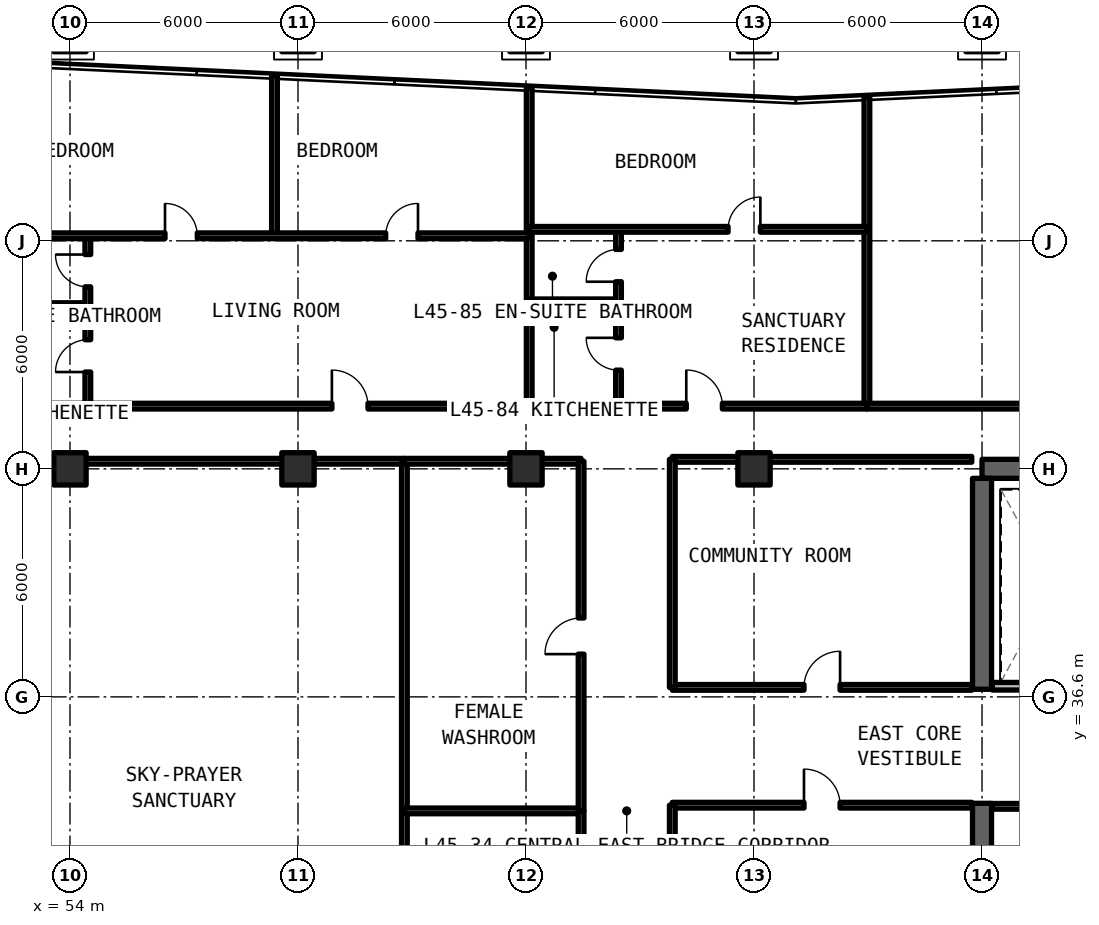
"""IFC4 building model, lengths in metres.
Left out: names, types, materials, properties, quantities, classifications, styles, units other than length and angle.
Written with IfcOpenShell. Run it as: python <this file> out.ifc"""

import sys

from ifc_helpers import new_model, si_unit, direction, frame, frame_2d, origin, origin_2d, place, context, subcontext, project, spatial, rectangle, extrude, element, fill, save


model = new_model("IFC4")
c1 = context("Model", 3, precision=1e-05, world=origin(), true_north=direction((0.0, 1.0)))
c2 = subcontext(c1, "Body", "Model", "MODEL_VIEW")
j1 = project(units=[si_unit("LENGTHUNIT", "METRE"), si_unit("PLANEANGLEUNIT", "RADIAN")], contexts=[c1])
p1 = place(None, origin())
s1 = spatial("IfcSite", under=j1, at=p1, CompositionType="ELEMENT")
p2 = place(p1, origin())
s2 = spatial("IfcBuilding", under=s1, at=p2, CompositionType="ELEMENT")
p3 = place(p2, frame((0.0, 0.0, 162.03)))
s3 = spatial("IfcBuildingStorey", under=s2, at=p3, CompositionType="ELEMENT", Elevation=162.03)
p4 = place(p3, frame((90.0, 42.6, 0.0), z_axis=(0.0, 0.0, 1.0), x_axis=(-1.0, 0.0, 0.0)))
e1 = element("IfcWall", 1, at=p4, inside=s3, PredefinedType="SHEAR", context=c2, shape_type="SweptSolid", body=[
    extrude(rectangle(XDim=12.0, YDim=0.5, at=frame_2d((6.0, 0.0))), origin(), (0.0, 0.0, 1.0), 3.63),
])
p5 = place(p3, frame((78.0, 24.85, 0.0), z_axis=(0.0, 0.0, 1.0), x_axis=(0.0, 1.0, 0.0)))
e2 = element("IfcWall", 2, at=p5, inside=s3, PredefinedType="SHEAR", context=c2, shape_type="SweptSolid", body=[
    extrude(rectangle(XDim=8.95, YDim=0.5, at=frame_2d((4.475, 0.0))), origin(), (0.0, 0.0, 1.0), 3.63),
])
p6 = place(p3, frame((78.0, 36.8, 0.0), z_axis=(0.0, 0.0, 1.0), x_axis=(0.0, 1.0, 0.0)))
e3 = element("IfcWall", 3, at=p6, inside=s3, PredefinedType="SHEAR", context=c2, shape_type="SweptSolid", body=[
    extrude(rectangle(XDim=5.55, YDim=0.5, at=frame_2d((2.775, 0.0))), origin(), (0.0, 0.0, 1.0), 3.63),
])
for number, where, z_axis, x_axis in (
    (4, (54.0, 42.6, 0.0), (0.0, 0.0, 1.0), (1.0, 0.0, 0.0)),
    (5, (60.0, 42.6, 0.0), (0.0, 0.0, 1.0), (1.0, 0.0, 0.0)),
    (6, (66.0, 42.6, 0.0), (0.0, 0.0, 1.0), (1.0, 0.0, 0.0)),
    (7, (72.0, 42.6, 0.0), (0.0, 0.0, 1.0), (1.0, 0.0, 0.0)),
):
    element("IfcColumn", number, at=place(p3, frame(where, z_axis=z_axis, x_axis=x_axis)), inside=s3, PredefinedType="COLUMN", context=c2, shape_type="SweptSolid", body=[
        extrude(rectangle(XDim=0.85, YDim=0.85, at=origin_2d()), origin(), (0.0, 0.0, 1.0), 3.63),
    ])
p7 = place(p3, frame((78.27, 33.72, 0.0), z_axis=(0.0, 0.0, 1.0), x_axis=(1.0, 0.0, 0.0)))
e8 = element("IfcWall", 8, at=p7, inside=s3, PredefinedType="SOLIDWALL", context=c2, shape_type="SweptSolid", body=[
    extrude(rectangle(XDim=3.05, YDim=0.15, at=frame_2d((1.525, 0.0))), origin(), (0.0, 0.0, 1.0), 2.63),
])
p8 = place(p3, frame((78.27, 36.88, 0.0), z_axis=(0.0, 0.0, 1.0), x_axis=(1.0, 0.0, 0.0)))
e9 = element("IfcWall", 9, at=p8, inside=s3, PredefinedType="SOLIDWALL", context=c2, shape_type="SweptSolid", body=[
    extrude(rectangle(XDim=3.05, YDim=0.2, at=frame_2d((1.525, 0.0))), origin(), (0.0, 0.0, 1.0), 2.63),
])
p9 = place(p3, frame((69.85, 33.75, 0.0), z_axis=(0.0, 0.0, 1.0), x_axis=(1.0, 0.0, 0.0)))
e10 = element("IfcWall", 10, at=p9, inside=s3, PredefinedType="SOLIDWALL", context=c2, shape_type="SweptSolid", body=[
    extrude(rectangle(XDim=7.88, YDim=0.15, at=frame_2d((3.94, 0.0))), origin(), (0.0, 0.0, 1.0), 2.63),
])
p10 = place(p9, frame((3.465, 0.0, 0.0)))
e11 = element("IfcOpeningElement", 11, at=p10, cuts=e10, PredefinedType="OPENING", context=c2, shape_type="SweptSolid", body=[
    extrude(rectangle(XDim=0.95, YDim=2.15, at=frame_2d((0.475, 1.075))), frame((0.0, 0.085, 0.0), z_axis=(0.0, -1.0, 0.0), x_axis=(1.0, 0.0, 0.0)), (0.0, 0.0, 1.0), 0.17),
])
p11 = place(p3, frame((69.85, 24.35, 0.0), z_axis=(0.0, 0.0, 1.0), x_axis=(0.0, 1.0, 0.0)))
e12 = element("IfcWall", 12, at=p11, inside=s3, PredefinedType="SOLIDWALL", context=c2, shape_type="SweptSolid", body=[
    extrude(rectangle(XDim=9.4, YDim=0.15, at=frame_2d((4.7, 0.0))), origin(), (0.0, 0.0, 1.0), 2.63),
])
p12 = place(p3, frame((69.85, 36.85, 0.0), z_axis=(0.0, 0.0, 1.0), x_axis=(1.0, 0.0, 0.0)))
e13 = element("IfcWall", 13, at=p12, inside=s3, PredefinedType="SOLIDWALL", context=c2, shape_type="SweptSolid", body=[
    extrude(rectangle(XDim=7.88, YDim=0.15, at=frame_2d((3.94, 0.0))), origin(), (0.0, 0.0, 1.0), 2.63),
])
p13 = place(p12, frame((3.465, 0.0, 0.0)))
e14 = element("IfcOpeningElement", 14, at=p13, cuts=e13, PredefinedType="OPENING", context=c2, shape_type="SweptSolid", body=[
    extrude(rectangle(XDim=0.95, YDim=2.15, at=frame_2d((0.475, 1.075))), frame((0.0, 0.085, 0.0), z_axis=(0.0, -1.0, 0.0), x_axis=(1.0, 0.0, 0.0)), (0.0, 0.0, 1.0), 0.17),
])
p14 = place(p3, frame((69.85, 42.85, 0.0), z_axis=(0.0, 0.0, 1.0), x_axis=(1.0, 0.0, 0.0)))
e15 = element("IfcWall", 15, at=p14, inside=s3, PredefinedType="SOLIDWALL", context=c2, shape_type="SweptSolid", body=[
    extrude(rectangle(XDim=7.88, YDim=0.15, at=frame_2d((3.94, 0.0))), origin(), (0.0, 0.0, 1.0), 2.63),
])
p15 = place(p3, frame((69.85, 36.85, 0.0), z_axis=(0.0, 0.0, 1.0), x_axis=(0.0, 1.0, 0.0)))
e16 = element("IfcWall", 16, at=p15, inside=s3, PredefinedType="SOLIDWALL", context=c2, shape_type="SweptSolid", body=[
    extrude(rectangle(XDim=6.0, YDim=0.15, at=frame_2d((3.0, 0.0))), origin(), (0.0, 0.0, 1.0), 2.63),
])
p16 = place(p3, frame((51.2, 42.8, 0.0), z_axis=(0.0, 0.0, 1.0), x_axis=(1.0, 0.0, 0.0)))
e17 = element("IfcWall", 17, at=p16, inside=s3, PredefinedType="SOLIDWALL", context=c2, shape_type="SweptSolid", body=[
    extrude(rectangle(XDim=11.6, YDim=0.15, at=frame_2d((5.8, 0.0))), origin(), (0.0, 0.0, 1.0), 2.63),
])
p17 = place(p3, frame((62.8, 24.4, 0.0), z_axis=(0.0, 0.0, 1.0), x_axis=(0.0, 1.0, 0.0)))
e18 = element("IfcWall", 18, at=p17, inside=s3, PredefinedType="SOLIDWALL", context=c2, shape_type="SweptSolid", body=[
    extrude(rectangle(XDim=18.4, YDim=0.15, at=frame_2d((9.2, 0.0))), origin(), (0.0, 0.0, 1.0), 2.63),
])
p18 = place(p3, frame((62.8, 33.6, 0.0), z_axis=(0.0, 0.0, 1.0), x_axis=(1.0, 0.0, 0.0)))
e19 = element("IfcWall", 19, at=p18, inside=s3, PredefinedType="SOLIDWALL", context=c2, shape_type="SweptSolid", body=[
    extrude(rectangle(XDim=4.65, YDim=0.15, at=frame_2d((2.325, 0.0))), origin(), (0.0, 0.0, 1.0), 2.63),
])
p19 = place(p3, frame((67.45, 24.4, 0.0), z_axis=(0.0, 0.0, 1.0), x_axis=(0.0, 1.0, 0.0)))
e20 = element("IfcWall", 20, at=p19, inside=s3, PredefinedType="SOLIDWALL", context=c2, shape_type="SweptSolid", body=[
    extrude(rectangle(XDim=9.2, YDim=0.15, at=frame_2d((4.6, 0.0))), origin(), (0.0, 0.0, 1.0), 2.63),
])
p20 = place(p19, frame((4.125, 0.0, 0.0)))
e21 = element("IfcOpeningElement", 21, at=p20, cuts=e20, PredefinedType="OPENING", context=c2, shape_type="SweptSolid", body=[
    extrude(rectangle(XDim=0.95, YDim=2.15, at=frame_2d((0.475, 1.075))), frame((0.0, 0.085, 0.0), z_axis=(0.0, -1.0, 0.0), x_axis=(1.0, 0.0, 0.0)), (0.0, 0.0, 1.0), 0.17),
])
p21 = place(p3, frame((62.8, 42.8, 0.0), z_axis=(0.0, 0.0, 1.0), x_axis=(1.0, 0.0, 0.0)))
e22 = element("IfcWall", 22, at=p21, inside=s3, PredefinedType="SOLIDWALL", context=c2, shape_type="SweptSolid", body=[
    extrude(rectangle(XDim=4.65, YDim=0.15, at=frame_2d((2.325, 0.0))), origin(), (0.0, 0.0, 1.0), 2.63),
])
p22 = place(p3, frame((67.45, 33.6, 0.0), z_axis=(0.0, 0.0, 1.0), x_axis=(0.0, 1.0, 0.0)))
e23 = element("IfcWall", 23, at=p22, inside=s3, PredefinedType="SOLIDWALL", context=c2, shape_type="SweptSolid", body=[
    extrude(rectangle(XDim=9.2, YDim=0.15, at=frame_2d((4.6, 0.0))), origin(), (0.0, 0.0, 1.0), 2.63),
])
p23 = place(p22, frame((4.125, 0.0, 0.0)))
e24 = element("IfcOpeningElement", 24, at=p23, cuts=e23, PredefinedType="OPENING", context=c2, shape_type="SweptSolid", body=[
    extrude(rectangle(XDim=0.95, YDim=2.15, at=frame_2d((0.475, 1.075))), frame((0.0, 0.085, 0.0), z_axis=(0.0, -1.0, 0.0), x_axis=(1.0, 0.0, 0.0)), (0.0, 0.0, 1.0), 0.17),
])
p24 = place(p3, frame((66.084, 44.25, 0.0), z_axis=(0.0, 0.0, 1.0), x_axis=(0.0, 1.0, 0.0)))
e25 = element("IfcWall", 25, at=p24, inside=s3, PredefinedType="SOLIDWALL", context=c2, shape_type="SweptSolid", body=[
    extrude(rectangle(XDim=8.377, YDim=0.15, at=frame_2d((4.188, 0.0))), origin(), (0.0, 0.0, 1.0), 2.63),
])
p25 = place(p3, frame((52.12, 46.895, 0.0), z_axis=(0.0, 0.0, 1.0), x_axis=(1.0, 0.0, 0.0)))
e26 = element("IfcWall", 26, at=p25, inside=s3, PredefinedType="PARTITIONING", context=c2, shape_type="SweptSolid", body=[
    extrude(rectangle(XDim=2.35, YDim=0.15, at=frame_2d((1.175, 0.0))), origin(), (0.0, 0.0, 1.0), 2.63),
])
p26 = place(p3, frame((54.47, 44.25, 0.0), z_axis=(0.0, 0.0, 1.0), x_axis=(0.0, 1.0, 0.0)))
e27 = element("IfcWall", 27, at=p26, inside=s3, PredefinedType="PARTITIONING", context=c2, shape_type="SweptSolid", body=[
    extrude(rectangle(XDim=4.483, YDim=0.15, at=frame_2d((2.241, 0.0))), origin(), (0.0, 0.0, 1.0), 2.63),
])
p27 = place(p26, frame((0.897, 0.0, 0.0)))
e28 = element("IfcOpeningElement", 28, at=p27, cuts=e27, PredefinedType="OPENING", context=c2, shape_type="SweptSolid", body=[
    extrude(rectangle(XDim=0.85, YDim=2.1, at=frame_2d((0.425, 1.05))), frame((0.0, 0.085, 0.0), z_axis=(0.0, -1.0, 0.0), x_axis=(1.0, 0.0, 0.0)), (0.0, 0.0, 1.0), 0.17),
])
p28 = place(p26, frame((3.139, 0.0, 0.0)))
e29 = element("IfcOpeningElement", 29, at=p28, cuts=e27, PredefinedType="OPENING", context=c2, shape_type="SweptSolid", body=[
    extrude(rectangle(XDim=0.85, YDim=2.1, at=frame_2d((0.425, 1.05))), frame((0.0, 0.085, 0.0), z_axis=(0.0, -1.0, 0.0), x_axis=(1.0, 0.0, 0.0)), (0.0, 0.0, 1.0), 0.17),
])
p29 = place(p3, frame((59.382, 48.733, 0.0), z_axis=(0.0, 0.0, 1.0), x_axis=(0.0, 1.0, 0.0)))
e30 = element("IfcWall", 30, at=p29, inside=s3, PredefinedType="PARTITIONING", context=c2, shape_type="SweptSolid", body=[
    extrude(rectangle(XDim=4.212, YDim=0.15, at=frame_2d((2.106, 0.0))), origin(), (0.0, 0.0, 1.0), 2.63),
])
p30 = place(p3, frame((52.12, 48.733, 0.0), z_axis=(0.0, 0.0, 1.0), x_axis=(1.0, 0.0, 0.0)))
e31 = element("IfcWall", 31, at=p30, inside=s3, PredefinedType="PARTITIONING", context=c2, shape_type="SweptSolid", body=[
    extrude(rectangle(XDim=13.964, YDim=0.15, at=frame_2d((6.982, 0.0))), origin(), (0.0, 0.0, 1.0), 2.63),
])
p31 = place(p30, frame((4.381, 0.0, 0.0)))
e32 = element("IfcOpeningElement", 32, at=p31, cuts=e31, PredefinedType="OPENING", context=c2, shape_type="SweptSolid", body=[
    extrude(rectangle(XDim=0.85, YDim=2.1, at=frame_2d((0.425, 1.05))), frame((0.0, 0.085, 0.0), z_axis=(0.0, -1.0, 0.0), x_axis=(1.0, 0.0, 0.0)), (0.0, 0.0, 1.0), 0.17),
])
p32 = place(p30, frame((10.188, 0.0, 0.0)))
e33 = element("IfcOpeningElement", 33, at=p32, cuts=e31, PredefinedType="OPENING", context=c2, shape_type="SweptSolid", body=[
    extrude(rectangle(XDim=0.85, YDim=2.1, at=frame_2d((0.425, 1.05))), frame((0.0, 0.085, 0.0), z_axis=(0.0, -1.0, 0.0), x_axis=(1.0, 0.0, 0.0)), (0.0, 0.0, 1.0), 0.17),
])
p33 = place(p3, frame((52.12, 44.25, 0.0), z_axis=(0.0, 0.0, 1.0), x_axis=(1.0, 0.0, 0.0)))
e34 = element("IfcWall", 34, at=p33, inside=s3, PredefinedType="SOLIDWALL", context=c2, shape_type="SweptSolid", body=[
    extrude(rectangle(XDim=13.964, YDim=0.15, at=frame_2d((6.982, 0.0))), origin(), (0.0, 0.0, 1.0), 2.63),
])
p34 = place(p33, frame((8.772, 0.0, 0.0)))
e35 = element("IfcOpeningElement", 35, at=p34, cuts=e34, PredefinedType="OPENING", context=c2, shape_type="SweptSolid", body=[
    extrude(rectangle(XDim=0.95, YDim=2.15, at=frame_2d((0.475, 1.075))), frame((0.0, 0.085, 0.0), z_axis=(0.0, -1.0, 0.0), x_axis=(1.0, 0.0, 0.0)), (0.0, 0.0, 1.0), 0.17),
])
p35 = place(p3, frame((74.971, 44.25, 0.0), z_axis=(0.0, 0.0, 1.0), x_axis=(0.0, 1.0, 0.0)))
e36 = element("IfcWall", 36, at=p35, inside=s3, PredefinedType="SOLIDWALL", context=c2, shape_type="SweptSolid", body=[
    extrude(rectangle(XDim=8.134, YDim=0.15, at=frame_2d((4.067, 0.0))), origin(), (0.0, 0.0, 1.0), 2.63),
])
p36 = place(p3, frame((66.084, 46.995, 0.0), z_axis=(0.0, 0.0, 1.0), x_axis=(1.0, 0.0, 0.0)))
e37 = element("IfcWall", 37, at=p36, inside=s3, PredefinedType="PARTITIONING", context=c2, shape_type="SweptSolid", body=[
    extrude(rectangle(XDim=2.35, YDim=0.15, at=frame_2d((1.175, 0.0))), origin(), (0.0, 0.0, 1.0), 2.63),
])
p37 = place(p3, frame((68.434, 44.25, 0.0), z_axis=(0.0, 0.0, 1.0), x_axis=(0.0, 1.0, 0.0)))
e38 = element("IfcWall", 38, at=p37, inside=s3, PredefinedType="PARTITIONING", context=c2, shape_type="SweptSolid", body=[
    extrude(rectangle(XDim=4.652, YDim=0.15, at=frame_2d((2.326, 0.0))), origin(), (0.0, 0.0, 1.0), 2.63),
])
p38 = place(p37, frame((0.948, 0.0, 0.0)))
e39 = element("IfcOpeningElement", 39, at=p38, cuts=e38, PredefinedType="OPENING", context=c2, shape_type="SweptSolid", body=[
    extrude(rectangle(XDim=0.85, YDim=2.1, at=frame_2d((0.425, 1.05))), frame((0.0, 0.085, 0.0), z_axis=(0.0, -1.0, 0.0), x_axis=(1.0, 0.0, 0.0)), (0.0, 0.0, 1.0), 0.17),
])
p39 = place(p37, frame((3.273, 0.0, 0.0)))
e40 = element("IfcOpeningElement", 40, at=p39, cuts=e38, PredefinedType="OPENING", context=c2, shape_type="SweptSolid", body=[
    extrude(rectangle(XDim=0.85, YDim=2.1, at=frame_2d((0.425, 1.05))), frame((0.0, 0.085, 0.0), z_axis=(0.0, -1.0, 0.0), x_axis=(1.0, 0.0, 0.0)), (0.0, 0.0, 1.0), 0.17),
])
p40 = place(p3, frame((66.084, 48.902, 0.0), z_axis=(0.0, 0.0, 1.0), x_axis=(1.0, 0.0, 0.0)))
e41 = element("IfcWall", 41, at=p40, inside=s3, PredefinedType="PARTITIONING", context=c2, shape_type="SweptSolid", body=[
    extrude(rectangle(XDim=8.886, YDim=0.15, at=frame_2d((4.443, 0.0))), origin(), (0.0, 0.0, 1.0), 2.63),
])
p41 = place(p40, frame((5.233, 0.0, 0.0)))
e42 = element("IfcOpeningElement", 42, at=p41, cuts=e41, PredefinedType="OPENING", context=c2, shape_type="SweptSolid", body=[
    extrude(rectangle(XDim=0.85, YDim=2.1, at=frame_2d((0.425, 1.05))), frame((0.0, 0.085, 0.0), z_axis=(0.0, -1.0, 0.0), x_axis=(1.0, 0.0, 0.0)), (0.0, 0.0, 1.0), 0.17),
])
p42 = place(p3, frame((66.084, 44.25, 0.0), z_axis=(0.0, 0.0, 1.0), x_axis=(1.0, 0.0, 0.0)))
e43 = element("IfcWall", 43, at=p42, inside=s3, PredefinedType="SOLIDWALL", context=c2, shape_type="SweptSolid", body=[
    extrude(rectangle(XDim=8.886, YDim=0.15, at=frame_2d((4.443, 0.0))), origin(), (0.0, 0.0, 1.0), 2.63),
])
p43 = place(p42, frame((4.133, 0.0, 0.0)))
e44 = element("IfcOpeningElement", 44, at=p43, cuts=e43, PredefinedType="OPENING", context=c2, shape_type="SweptSolid", body=[
    extrude(rectangle(XDim=0.95, YDim=2.15, at=frame_2d((0.475, 1.075))), frame((0.0, 0.085, 0.0), z_axis=(0.0, -1.0, 0.0), x_axis=(1.0, 0.0, 0.0)), (0.0, 0.0, 1.0), 0.17),
])
p44 = place(p3, frame((74.971, 44.25, 0.0), z_axis=(0.0, 0.0, 1.0), x_axis=(1.0, 0.0, 0.0)))
e45 = element("IfcWall", 45, at=p44, inside=s3, PredefinedType="SOLIDWALL", context=c2, shape_type="SweptSolid", body=[
    extrude(rectangle(XDim=11.743, YDim=0.15, at=frame_2d((5.872, 0.0))), origin(), (0.0, 0.0, 1.0), 2.63),
])
p45 = place(p44, frame((5.321, 0.0, 0.0)))
e46 = element("IfcOpeningElement", 46, at=p45, cuts=e45, PredefinedType="OPENING", context=c2, shape_type="SweptSolid", body=[
    extrude(rectangle(XDim=1.1, YDim=2.15, at=frame_2d((0.55, 1.075))), frame((0.0, 0.085, 0.0), z_axis=(0.0, -1.0, 0.0), x_axis=(1.0, 0.0, 0.0)), (0.0, 0.0, 1.0), 0.17),
])
p46 = place(p10, origin())
e47 = element("IfcDoor", 47, at=p46, inside=s3, OperationType="SINGLE_SWING_LEFT", PredefinedType="DOOR", context=c2, shape_type="SweptSolid", body=[
    extrude(rectangle(XDim=0.95, YDim=2.15, at=frame_2d((0.475, 1.075))), frame((0.0, 0.025, 0.0), z_axis=(0.0, -1.0, 0.0), x_axis=(1.0, 0.0, 0.0)), (0.0, 0.0, 1.0), 0.05),
])
fill(e11, e47)
p47 = place(p13, origin())
e48 = element("IfcDoor", 48, at=p47, inside=s3, OperationType="SINGLE_SWING_RIGHT", PredefinedType="DOOR", context=c2, shape_type="SweptSolid", body=[
    extrude(rectangle(XDim=0.95, YDim=2.15, at=frame_2d((0.475, 1.075))), frame((0.0, 0.025, 0.0), z_axis=(0.0, -1.0, 0.0), x_axis=(1.0, 0.0, 0.0)), (0.0, 0.0, 1.0), 0.05),
])
fill(e14, e48)
p48 = place(p23, origin())
e49 = element("IfcDoor", 49, at=p48, inside=s3, OperationType="SINGLE_SWING_LEFT", PredefinedType="DOOR", context=c2, shape_type="SweptSolid", body=[
    extrude(rectangle(XDim=0.95, YDim=2.15, at=frame_2d((0.475, 1.075))), frame((0.0, 0.025, 0.0), z_axis=(0.0, -1.0, 0.0), x_axis=(1.0, 0.0, 0.0)), (0.0, 0.0, 1.0), 0.05),
])
fill(e24, e49)
p49 = place(p27, origin())
e50 = element("IfcDoor", 50, at=p49, inside=s3, OperationType="SINGLE_SWING_LEFT", PredefinedType="DOOR", context=c2, shape_type="SweptSolid", body=[
    extrude(rectangle(XDim=0.85, YDim=2.1, at=frame_2d((0.425, 1.05))), frame((0.0, 0.025, 0.0), z_axis=(0.0, -1.0, 0.0), x_axis=(1.0, 0.0, 0.0)), (0.0, 0.0, 1.0), 0.05),
])
fill(e28, e50)
p50 = place(p28, origin())
e51 = element("IfcDoor", 51, at=p50, inside=s3, OperationType="SINGLE_SWING_RIGHT", PredefinedType="DOOR", context=c2, shape_type="SweptSolid", body=[
    extrude(rectangle(XDim=0.85, YDim=2.1, at=frame_2d((0.425, 1.05))), frame((0.0, 0.025, 0.0), z_axis=(0.0, -1.0, 0.0), x_axis=(1.0, 0.0, 0.0)), (0.0, 0.0, 1.0), 0.05),
])
fill(e29, e51)
p51 = place(p31, origin())
e52 = element("IfcDoor", 52, at=p51, inside=s3, OperationType="SINGLE_SWING_LEFT", PredefinedType="DOOR", context=c2, shape_type="SweptSolid", body=[
    extrude(rectangle(XDim=0.85, YDim=2.1, at=frame_2d((0.425, 1.05))), frame((0.0, 0.025, 0.0), z_axis=(0.0, -1.0, 0.0), x_axis=(1.0, 0.0, 0.0)), (0.0, 0.0, 1.0), 0.05),
])
fill(e32, e52)
p52 = place(p32, origin())
e53 = element("IfcDoor", 53, at=p52, inside=s3, OperationType="SINGLE_SWING_RIGHT", PredefinedType="DOOR", context=c2, shape_type="SweptSolid", body=[
    extrude(rectangle(XDim=0.85, YDim=2.1, at=frame_2d((0.425, 1.05))), frame((0.0, 0.025, 0.0), z_axis=(0.0, -1.0, 0.0), x_axis=(1.0, 0.0, 0.0)), (0.0, 0.0, 1.0), 0.05),
])
fill(e33, e53)
p53 = place(p34, origin())
e54 = element("IfcDoor", 54, at=p53, inside=s3, OperationType="SINGLE_SWING_LEFT", PredefinedType="DOOR", context=c2, shape_type="SweptSolid", body=[
    extrude(rectangle(XDim=0.95, YDim=2.15, at=frame_2d((0.475, 1.075))), frame((0.0, 0.025, 0.0), z_axis=(0.0, -1.0, 0.0), x_axis=(1.0, 0.0, 0.0)), (0.0, 0.0, 1.0), 0.05),
])
fill(e35, e54)
p54 = place(p38, origin())
e55 = element("IfcDoor", 55, at=p54, inside=s3, OperationType="SINGLE_SWING_RIGHT", PredefinedType="DOOR", context=c2, shape_type="SweptSolid", body=[
    extrude(rectangle(XDim=0.85, YDim=2.1, at=frame_2d((0.425, 1.05))), frame((0.0, 0.025, 0.0), z_axis=(0.0, -1.0, 0.0), x_axis=(1.0, 0.0, 0.0)), (0.0, 0.0, 1.0), 0.05),
])
fill(e39, e55)
p55 = place(p39, origin())
e56 = element("IfcDoor", 56, at=p55, inside=s3, OperationType="SINGLE_SWING_LEFT", PredefinedType="DOOR", context=c2, shape_type="SweptSolid", body=[
    extrude(rectangle(XDim=0.85, YDim=2.1, at=frame_2d((0.425, 1.05))), frame((0.0, 0.025, 0.0), z_axis=(0.0, -1.0, 0.0), x_axis=(1.0, 0.0, 0.0)), (0.0, 0.0, 1.0), 0.05),
])
fill(e40, e56)
p56 = place(p41, origin())
e57 = element("IfcDoor", 57, at=p56, inside=s3, OperationType="SINGLE_SWING_RIGHT", PredefinedType="DOOR", context=c2, shape_type="SweptSolid", body=[
    extrude(rectangle(XDim=0.85, YDim=2.1, at=frame_2d((0.425, 1.05))), frame((0.0, 0.025, 0.0), z_axis=(0.0, -1.0, 0.0), x_axis=(1.0, 0.0, 0.0)), (0.0, 0.0, 1.0), 0.05),
])
fill(e42, e57)
p57 = place(p43, origin())
e58 = element("IfcDoor", 58, at=p57, inside=s3, OperationType="SINGLE_SWING_LEFT", PredefinedType="DOOR", context=c2, shape_type="SweptSolid", body=[
    extrude(rectangle(XDim=0.95, YDim=2.15, at=frame_2d((0.475, 1.075))), frame((0.0, 0.025, 0.0), z_axis=(0.0, -1.0, 0.0), x_axis=(1.0, 0.0, 0.0)), (0.0, 0.0, 1.0), 0.05),
])
fill(e44, e58)
save(model, sys.argv[1])
